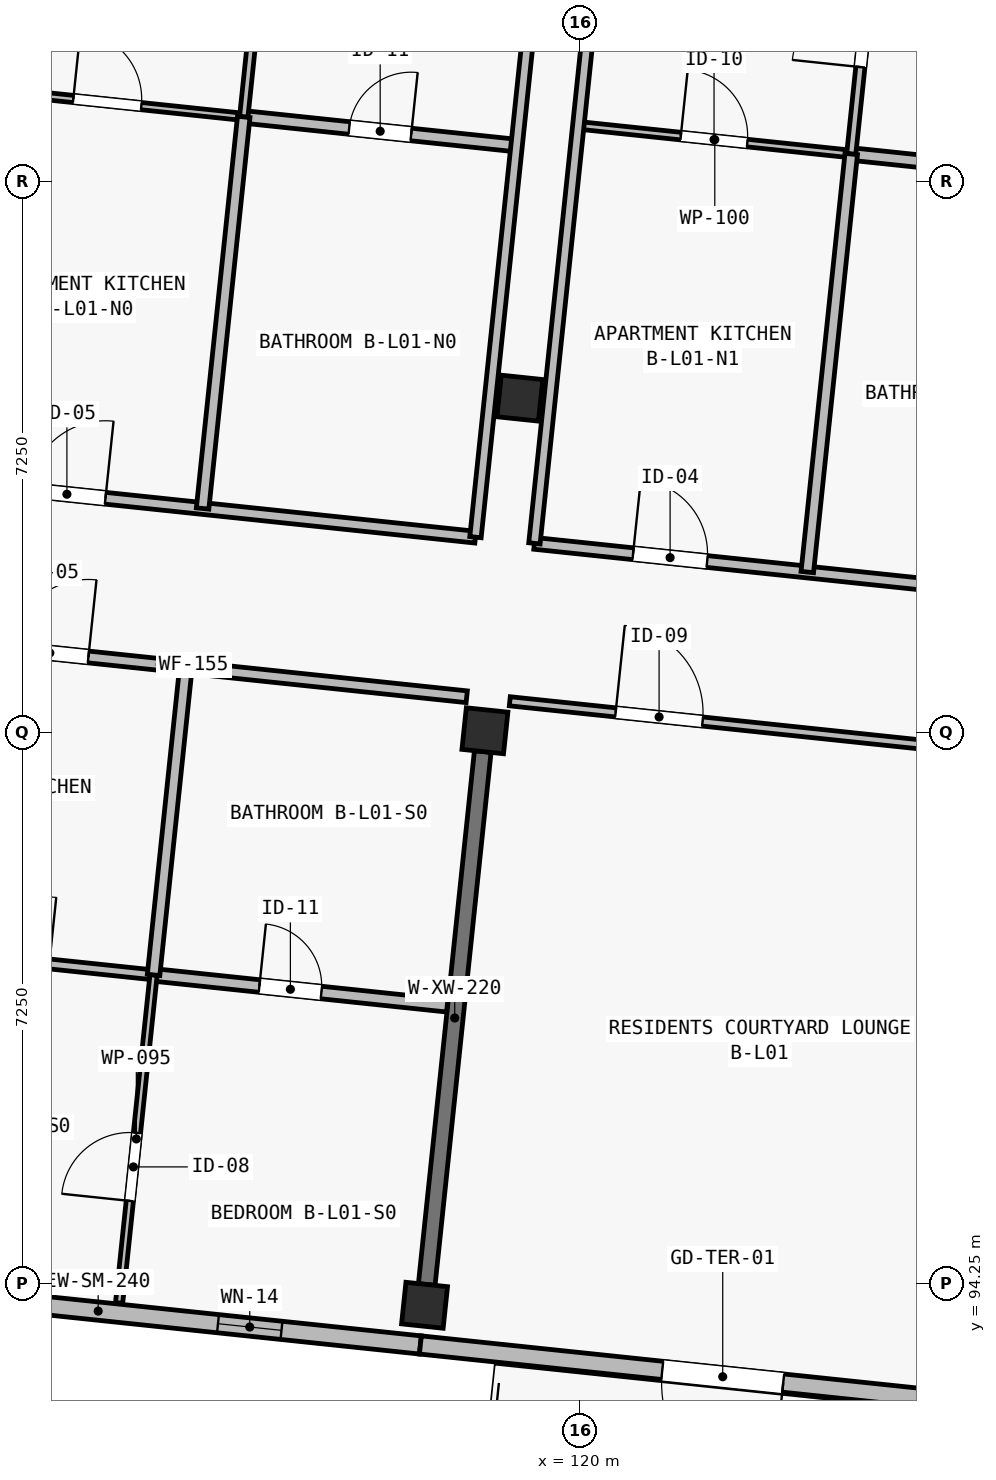
"""IFC4 building model, lengths in metres.
Left out: names, types, materials, properties, quantities, classifications, styles, units other than length and angle.
Written with IfcOpenShell. Run it as: python <this file> out.ifc"""

import sys

from ifc_helpers import new_model, si_unit, direction, frame, frame_2d, origin, origin_2d, place, context, subcontext, project, spatial, rectangle, extrude, element, fill, save


model = new_model("IFC4")
c1 = context("Model", 3, precision=1e-05, world=origin(), true_north=direction((0.0, 1.0)))
c2 = subcontext(c1, "Body", "Model", "MODEL_VIEW")
j1 = project(units=[si_unit("LENGTHUNIT", "METRE"), si_unit("PLANEANGLEUNIT", "RADIAN")], contexts=[c1])
p1 = place(None, origin())
s1 = spatial("IfcSite", under=j1, at=p1, CompositionType="ELEMENT")
p2 = place(p1, origin())
s2 = spatial("IfcBuilding", under=s1, at=p2, CompositionType="ELEMENT")
p3 = place(p2, frame((0.0, 0.0, 4.5)))
s3 = spatial("IfcBuildingStorey", under=s2, at=p3, CompositionType="ELEMENT", Elevation=4.5)
for number, where, z_axis, x_axis in (
    (1, (117.956, 93.964, 0.0), (0.0, 0.0, 1.0), (0.995, -0.105, 0.0)),
    (2, (118.75, 101.522, 0.0), (0.0, 0.0, 1.0), (0.995, -0.105, 0.0)),
    (3, (119.21, 105.898, 0.0), (0.0, 0.0, 1.0), (0.995, -0.105, 0.0)),
):
    element("IfcColumn", number, at=place(p3, frame(where, z_axis=z_axis, x_axis=x_axis)), inside=s3, PredefinedType="COLUMN", context=c2, shape_type="SweptSolid", body=[
        extrude(rectangle(XDim=0.55, YDim=0.55, at=origin_2d()), origin(), (0.0, 0.0, 1.0), 3.9),
    ])
p4 = place(p3, frame((117.985, 94.237, -0.25), z_axis=(0.0, 0.0, 1.0), x_axis=(0.104549582151, 0.994519675458, 0.0)))
e4 = element("IfcWall", 4, at=p4, inside=s3, PredefinedType="SHEAR", context=c2, shape_type="SweptSolid", body=[
    extrude(rectangle(XDim=7.05, YDim=0.22, at=frame_2d((3.525, 0.0))), origin(), (0.0, 0.0, 1.0), 3.4),
])
p5 = place(p3, frame((117.901, 93.442, 0.0), z_axis=(0.0, 0.0, 1.0), x_axis=(-0.994521760736, 0.104529744196, 0.0)))
e5 = element("IfcWall", 5, at=p5, inside=s3, PredefinedType="SOLIDWALL", context=c2, shape_type="SweptSolid", body=[
    extrude(rectangle(XDim=8.525, YDim=0.24, at=frame_2d((4.262, 0.0))), origin(), (0.0, 0.0, 1.0), 3.65),
])
p6 = place(p5, frame((1.837, 0.0, 0.48)))
e6 = element("IfcOpeningElement", 6, at=p6, cuts=e5, PredefinedType="OPENING", context=c2, shape_type="SweptSolid", body=[
    extrude(rectangle(XDim=0.84, YDim=2.28, at=frame_2d((0.42, 1.14))), frame((0.0, 0.135, 0.0), z_axis=(0.0, -1.0, 0.0), x_axis=(1.0, 0.0, 0.0)), (0.0, 0.0, 1.0), 0.27),
])
p7 = place(p5, frame((5.366, 0.0, 0.48)))
e7 = element("IfcOpeningElement", 7, at=p7, cuts=e5, PredefinedType="OPENING", context=c2, shape_type="SweptSolid", body=[
    extrude(rectangle(XDim=0.6, YDim=2.22, at=frame_2d((0.3, 1.11))), frame((0.0, 0.135, 0.0), z_axis=(0.0, -1.0, 0.0), x_axis=(1.0, 0.0, 0.0)), (0.0, 0.0, 1.0), 0.27),
])
p8 = place(p3, frame((125.857, 92.605, 0.0), z_axis=(0.0, 0.0, 1.0), x_axis=(-0.994522329422, 0.104524333444, 0.0)))
e8 = element("IfcWall", 8, at=p8, inside=s3, PredefinedType="SOLIDWALL", context=c2, shape_type="SweptSolid", body=[
    extrude(rectangle(XDim=8.0, YDim=0.24, at=frame_2d((4.0, 0.0))), origin(), (0.0, 0.0, 1.0), 3.65),
])
p9 = place(p8, frame((3.2, 0.0, 0.0)))
e9 = element("IfcOpeningElement", 9, at=p9, cuts=e8, PredefinedType="OPENING", context=c2, shape_type="SweptSolid", body=[
    extrude(rectangle(XDim=1.6, YDim=2.15, at=frame_2d((0.8, 1.075))), frame((0.0, 0.135, 0.0), z_axis=(0.0, -1.0, 0.0), x_axis=(1.0, 0.0, 0.0)), (0.0, 0.0, 1.0), 0.27),
])
p10 = place(p3, frame((110.446, 102.817, 0.0), z_axis=(0.0, 0.0, 1.0), x_axis=(0.994522594842, -0.104521808006, 0.0)))
e10 = element("IfcWall", 10, at=p10, inside=s3, PredefinedType="PARTITIONING", context=c2, shape_type="SweptSolid", body=[
    extrude(rectangle(XDim=8.11, YDim=0.155, at=frame_2d((4.055, 0.0))), origin(), (0.0, 0.0, 1.0), 3.62),
])
p11 = place(p10, frame((2.085, 0.0, 0.0)))
e11 = element("IfcOpeningElement", 11, at=p11, cuts=e10, PredefinedType="OPENING", context=c2, shape_type="SweptSolid", body=[
    extrude(rectangle(XDim=1.02, YDim=2.2, at=frame_2d((0.51, 1.1))), frame((0.0, 0.093, 0.0), z_axis=(0.0, -1.0, 0.0), x_axis=(1.0, 0.0, 0.0)), (0.0, 0.0, 1.0), 0.185),
])
p12 = place(p3, frame((110.02, 98.77, 0.0), z_axis=(0.0, 0.0, 1.0), x_axis=(0.994525828039, -0.104491039633, 0.0)))
e12 = element("IfcWall", 12, at=p12, inside=s3, PredefinedType="PARTITIONING", context=c2, shape_type="SweptSolid", body=[
    extrude(rectangle(XDim=4.395, YDim=0.13, at=frame_2d((2.198, 0.0))), origin(), (0.0, 0.0, 1.0), 3.62),
])
p13 = place(p12, frame((2.135, 0.0, 0.0)))
e13 = element("IfcOpeningElement", 13, at=p13, cuts=e12, PredefinedType="OPENING", context=c2, shape_type="SweptSolid", body=[
    extrude(rectangle(XDim=0.88, YDim=2.1, at=frame_2d((0.44, 1.05))), frame((0.0, 0.08, 0.0), z_axis=(0.0, -1.0, 0.0), x_axis=(1.0, 0.0, 0.0)), (0.0, 0.0, 1.0), 0.16),
])
p14 = place(p3, frame((114.391, 98.31, 0.0), z_axis=(0.0, 0.0, 1.0), x_axis=(0.994517841934, -0.104567021925, 0.0)))
e14 = element("IfcWall", 14, at=p14, inside=s3, PredefinedType="PLUMBINGWALL", context=c2, shape_type="SweptSolid", body=[
    extrude(rectangle(XDim=3.885, YDim=0.165, at=frame_2d((1.942, 0.0))), origin(), (0.0, 0.0, 1.0), 3.62),
])
p15 = place(p14, frame((1.4, 0.0, 0.0)))
e15 = element("IfcOpeningElement", 15, at=p15, cuts=e14, PredefinedType="OPENING", context=c2, shape_type="SweptSolid", body=[
    extrude(rectangle(XDim=0.82, YDim=2.08, at=frame_2d((0.41, 1.04))), frame((0.0, 0.097, 0.0), z_axis=(0.0, -1.0, 0.0), x_axis=(1.0, 0.0, 0.0)), (0.0, 0.0, 1.0), 0.195),
])
p16 = place(p3, frame((113.937, 93.994, 0.0), z_axis=(0.0, 0.0, 1.0), x_axis=(0.104520797474, 0.994522701046, 0.0)))
e16 = element("IfcWall", 16, at=p16, inside=s3, PredefinedType="PARTITIONING", context=c2, shape_type="SweptSolid", body=[
    extrude(rectangle(XDim=4.34, YDim=0.095, at=frame_2d((2.17, 0.0))), origin(), (0.0, 0.0, 1.0), 3.62),
])
p17 = place(p16, frame((1.35, 0.0, 0.0)))
e17 = element("IfcOpeningElement", 17, at=p17, cuts=e16, PredefinedType="OPENING", context=c2, shape_type="SweptSolid", body=[
    extrude(rectangle(XDim=0.9, YDim=2.1, at=frame_2d((0.45, 1.05))), frame((0.0, 0.062, 0.0), z_axis=(0.0, -1.0, 0.0), x_axis=(1.0, 0.0, 0.0)), (0.0, 0.0, 1.0), 0.125),
])
p18 = place(p3, frame((114.391, 98.31, 0.0), z_axis=(0.0, 0.0, 1.0), x_axis=(0.104556757316, 0.994518921137, 0.0)))
e18 = element("IfcWall", 18, at=p18, inside=s3, PredefinedType="PLUMBINGWALL", context=c2, shape_type="SweptSolid", body=[
    extrude(rectangle(XDim=4.07, YDim=0.165, at=frame_2d((2.035, 0.0))), origin(), (0.0, 0.0, 1.0), 3.62),
])
p19 = place(p3, frame((119.078, 101.91, 0.0), z_axis=(0.0, 0.0, 1.0), x_axis=(0.99451912784, -0.104554791185, 0.0)))
e19 = element("IfcWall", 19, at=p19, inside=s3, PredefinedType="PARTITIONING", context=c2, shape_type="SweptSolid", body=[
    extrude(rectangle(XDim=7.43, YDim=0.12, at=frame_2d((3.715, 0.0))), origin(), (0.0, 0.0, 1.0), 3.62),
])
p20 = place(p19, frame((1.4, 0.0, 0.0)))
e20 = element("IfcOpeningElement", 20, at=p20, cuts=e19, PredefinedType="OPENING", context=c2, shape_type="SweptSolid", body=[
    extrude(rectangle(XDim=1.15, YDim=2.15, at=frame_2d((0.575, 1.075))), frame((0.0, 0.075, 0.0), z_axis=(0.0, -1.0, 0.0), x_axis=(1.0, 0.0, 0.0)), (0.0, 0.0, 1.0), 0.15),
])
p21 = place(p3, frame((111.446, 104.824, 0.0), z_axis=(0.0, 0.0, 1.0), x_axis=(0.994522671024, -0.104521083137, 0.0)))
e21 = element("IfcWall", 21, at=p21, inside=s3, PredefinedType="PARTITIONING", context=c2, shape_type="SweptSolid", body=[
    extrude(rectangle(XDim=7.22, YDim=0.155, at=frame_2d((3.61, 0.0))), origin(), (0.0, 0.0, 1.0), 3.62),
])
p22 = place(p21, frame((1.305, 0.0, 0.0)))
e22 = element("IfcOpeningElement", 22, at=p22, cuts=e21, PredefinedType="OPENING", context=c2, shape_type="SweptSolid", body=[
    extrude(rectangle(XDim=1.02, YDim=2.2, at=frame_2d((0.51, 1.1))), frame((0.0, 0.093, 0.0), z_axis=(0.0, -1.0, 0.0), x_axis=(1.0, 0.0, 0.0)), (0.0, 0.0, 1.0), 0.185),
])
p23 = place(p3, frame((111.987, 109.975, 0.0), z_axis=(0.0, 0.0, 1.0), x_axis=(0.994526554618, -0.104484123955, 0.0)))
e23 = element("IfcWall", 23, at=p23, inside=s3, PredefinedType="PARTITIONING", context=c2, shape_type="SweptSolid", body=[
    extrude(rectangle(XDim=3.61, YDim=0.095, at=frame_2d((1.805, 0.0))), origin(), (0.0, 0.0, 1.0), 3.62),
])
p24 = place(p23, frame((1.355, 0.0, 0.0)))
e24 = element("IfcOpeningElement", 24, at=p24, cuts=e23, PredefinedType="OPENING", context=c2, shape_type="SweptSolid", body=[
    extrude(rectangle(XDim=0.9, YDim=2.1, at=frame_2d((0.45, 1.05))), frame((0.0, 0.062, 0.0), z_axis=(0.0, -1.0, 0.0), x_axis=(1.0, 0.0, 0.0)), (0.0, 0.0, 1.0), 0.125),
])
p25 = place(p3, frame((115.577, 109.598, 0.0), z_axis=(0.0, 0.0, 1.0), x_axis=(0.994518785821, -0.104558044398, 0.0)))
e25 = element("IfcWall", 25, at=p25, inside=s3, PredefinedType="PLUMBINGWALL", context=c2, shape_type="SweptSolid", body=[
    extrude(rectangle(XDim=3.61, YDim=0.165, at=frame_2d((1.805, 0.0))), origin(), (0.0, 0.0, 1.0), 3.62),
])
p26 = place(p25, frame((1.395, 0.0, 0.0)))
e26 = element("IfcOpeningElement", 26, at=p26, cuts=e25, PredefinedType="OPENING", context=c2, shape_type="SweptSolid", body=[
    extrude(rectangle(XDim=0.82, YDim=2.08, at=frame_2d((0.41, 1.04))), frame((0.0, 0.097, 0.0), z_axis=(0.0, -1.0, 0.0), x_axis=(1.0, 0.0, 0.0)), (0.0, 0.0, 1.0), 0.195),
])
p27 = place(p3, frame((115.577, 109.598, 0.0), z_axis=(0.0, 0.0, 1.0), x_axis=(0.104527618124, 0.994521984196, 0.0)))
e27 = element("IfcWall", 27, at=p27, inside=s3, PredefinedType="PARTITIONING", context=c2, shape_type="SweptSolid", body=[
    extrude(rectangle(XDim=4.69, YDim=0.11, at=frame_2d((2.345, 0.0))), origin(), (0.0, 0.0, 1.0), 3.62),
])
p28 = place(p27, frame((1.15, 0.0, 0.0)))
e28 = element("IfcOpeningElement", 28, at=p28, cuts=e27, PredefinedType="OPENING", context=c2, shape_type="SweptSolid", body=[
    extrude(rectangle(XDim=0.9, YDim=2.1, at=frame_2d((0.45, 1.05))), frame((0.0, 0.07, 0.0), z_axis=(0.0, -1.0, 0.0), x_axis=(1.0, 0.0, 0.0)), (0.0, 0.0, 1.0), 0.14),
])
p29 = place(p3, frame((115.036, 104.447, 0.0), z_axis=(0.0, 0.0, 1.0), x_axis=(0.104537578263, 0.994520937301, 0.0)))
e29 = element("IfcWall", 29, at=p29, inside=s3, PredefinedType="PLUMBINGWALL", context=c2, shape_type="SweptSolid", body=[
    extrude(rectangle(XDim=5.18, YDim=0.165, at=frame_2d((2.59, 0.0))), origin(), (0.0, 0.0, 1.0), 3.62),
])
p30 = place(p3, frame((118.626, 104.069, 0.0), z_axis=(0.0, 0.0, 1.0), x_axis=(0.104508379977, 0.994524006002, 0.0)))
e30 = element("IfcWall", 30, at=p30, inside=s3, PredefinedType="PARTITIONING", context=c2, shape_type="SweptSolid", body=[
    extrude(rectangle(XDim=9.87, YDim=0.15, at=frame_2d((4.935, 0.0))), origin(), (0.0, 0.0, 1.0), 3.62),
])
p31 = place(p3, frame((119.402, 103.988, 0.0), z_axis=(0.0, 0.0, 1.0), x_axis=(0.994522671024, -0.104521083137, 0.0)))
e31 = element("IfcWall", 31, at=p31, inside=s3, PredefinedType="PARTITIONING", context=c2, shape_type="SweptSolid", body=[
    extrude(rectangle(XDim=7.22, YDim=0.155, at=frame_2d((3.61, 0.0))), origin(), (0.0, 0.0, 1.0), 3.62),
])
p32 = place(p31, frame((1.305, 0.0, 0.0)))
e32 = element("IfcOpeningElement", 32, at=p32, cuts=e31, PredefinedType="OPENING", context=c2, shape_type="SweptSolid", body=[
    extrude(rectangle(XDim=0.98, YDim=2.15, at=frame_2d((0.49, 1.075))), frame((0.0, 0.093, 0.0), z_axis=(0.0, -1.0, 0.0), x_axis=(1.0, 0.0, 0.0)), (0.0, 0.0, 1.0), 0.185),
])
p33 = place(p3, frame((119.98, 109.487, 0.0), z_axis=(0.0, 0.0, 1.0), x_axis=(0.994518785821, -0.104558044398, 0.0)))
e33 = element("IfcWall", 33, at=p33, inside=s3, PredefinedType="PARTITIONING", context=c2, shape_type="SweptSolid", body=[
    extrude(rectangle(XDim=3.61, YDim=0.1, at=frame_2d((1.805, 0.0))), origin(), (0.0, 0.0, 1.0), 3.62),
])
p34 = place(p33, frame((1.355, 0.0, 0.0)))
e34 = element("IfcOpeningElement", 34, at=p34, cuts=e33, PredefinedType="OPENING", context=c2, shape_type="SweptSolid", body=[
    extrude(rectangle(XDim=0.88, YDim=2.1, at=frame_2d((0.44, 1.05))), frame((0.0, 0.065, 0.0), z_axis=(0.0, -1.0, 0.0), x_axis=(1.0, 0.0, 0.0)), (0.0, 0.0, 1.0), 0.13),
])
p35 = place(p3, frame((123.57, 109.11, 0.0), z_axis=(0.0, 0.0, 1.0), x_axis=(0.994526554618, -0.104484123955, 0.0)))
e35 = element("IfcWall", 35, at=p35, inside=s3, PredefinedType="PLUMBINGWALL", context=c2, shape_type="SweptSolid", body=[
    extrude(rectangle(XDim=3.61, YDim=0.165, at=frame_2d((1.805, 0.0))), origin(), (0.0, 0.0, 1.0), 3.62),
])
p36 = place(p35, frame((1.395, 0.0, 0.0)))
e36 = element("IfcOpeningElement", 36, at=p36, cuts=e35, PredefinedType="OPENING", context=c2, shape_type="SweptSolid", body=[
    extrude(rectangle(XDim=0.82, YDim=2.08, at=frame_2d((0.41, 1.04))), frame((0.0, 0.097, 0.0), z_axis=(0.0, -1.0, 0.0), x_axis=(1.0, 0.0, 0.0)), (0.0, 0.0, 1.0), 0.195),
])
p37 = place(p3, frame((123.57, 109.11, 0.0), z_axis=(0.0, 0.0, 1.0), x_axis=(0.104514950243, 0.994523315552, 0.0)))
e37 = element("IfcWall", 37, at=p37, inside=s3, PredefinedType="PARTITIONING", context=c2, shape_type="SweptSolid", body=[
    extrude(rectangle(XDim=4.34, YDim=0.12, at=frame_2d((2.17, 0.0))), origin(), (0.0, 0.0, 1.0), 3.62),
])
p38 = place(p37, frame((1.15, 0.0, 0.0)))
e38 = element("IfcOpeningElement", 38, at=p38, cuts=e37, PredefinedType="OPENING", context=c2, shape_type="SweptSolid", body=[
    extrude(rectangle(XDim=0.9, YDim=2.1, at=frame_2d((0.45, 1.05))), frame((0.0, 0.075, 0.0), z_axis=(0.0, -1.0, 0.0), x_axis=(1.0, 0.0, 0.0)), (0.0, 0.0, 1.0), 0.15),
])
p39 = place(p3, frame((122.992, 103.61, 0.0), z_axis=(0.0, 0.0, 1.0), x_axis=(0.104498634796, 0.994525030015, 0.0)))
e39 = element("IfcWall", 39, at=p39, inside=s3, PredefinedType="PLUMBINGWALL", context=c2, shape_type="SweptSolid", body=[
    extrude(rectangle(XDim=5.53, YDim=0.165, at=frame_2d((2.765, 0.0))), origin(), (0.0, 0.0, 1.0), 3.62),
])
p40 = place(p3, frame((119.402, 103.988, 0.0), z_axis=(0.0, 0.0, 1.0), x_axis=(0.10453284543, 0.994521434775, 0.0)))
e40 = element("IfcWall", 40, at=p40, inside=s3, PredefinedType="PARTITIONING", context=c2, shape_type="SweptSolid", body=[
    extrude(rectangle(XDim=9.87, YDim=0.15, at=frame_2d((4.935, 0.0))), origin(), (0.0, 0.0, 1.0), 3.62),
])
p41 = place(p6, origin())
e41 = element("IfcWindow", 41, at=p41, inside=s3, PartitioningType="SINGLE_PANEL", PredefinedType="WINDOW", context=c2, shape_type="SweptSolid", body=[
    extrude(rectangle(XDim=0.84, YDim=2.28, at=frame_2d((0.42, 1.14))), frame((0.0, 0.03, 0.0), z_axis=(0.0, -1.0, 0.0), x_axis=(1.0, 0.0, 0.0)), (0.0, 0.0, 1.0), 0.06),
])
fill(e6, e41)
p42 = place(p9, origin())
e42 = element("IfcDoor", 42, at=p42, inside=s3, OperationType="DOUBLE_DOOR_SINGLE_SWING", PredefinedType="DOOR", context=c2, shape_type="SweptSolid", body=[
    extrude(rectangle(XDim=1.6, YDim=2.15, at=frame_2d((0.8, 1.075))), frame((0.0, 0.025, 0.0), z_axis=(0.0, -1.0, 0.0), x_axis=(1.0, 0.0, 0.0)), (0.0, 0.0, 1.0), 0.05),
])
fill(e9, e42)
p43 = place(p11, origin())
e43 = element("IfcDoor", 43, at=p43, inside=s3, OperationType="SINGLE_SWING_RIGHT", PredefinedType="DOOR", context=c2, shape_type="SweptSolid", body=[
    extrude(rectangle(XDim=1.02, YDim=2.2, at=frame_2d((0.51, 1.1))), frame((0.0, 0.025, 0.0), z_axis=(0.0, -1.0, 0.0), x_axis=(1.0, 0.0, 0.0)), (0.0, 0.0, 1.0), 0.05),
])
fill(e11, e43)
p44 = place(p15, origin())
e44 = element("IfcDoor", 44, at=p44, inside=s3, OperationType="SINGLE_SWING_LEFT", PredefinedType="DOOR", context=c2, shape_type="SweptSolid", body=[
    extrude(rectangle(XDim=0.82, YDim=2.08, at=frame_2d((0.41, 1.04))), frame((0.0, 0.025, 0.0), z_axis=(0.0, -1.0, 0.0), x_axis=(1.0, 0.0, 0.0)), (0.0, 0.0, 1.0), 0.05),
])
fill(e15, e44)
p45 = place(p17, origin())
e45 = element("IfcDoor", 45, at=p45, inside=s3, OperationType="SINGLE_SWING_LEFT", PredefinedType="DOOR", context=c2, shape_type="SweptSolid", body=[
    extrude(rectangle(XDim=0.9, YDim=2.1, at=frame_2d((0.45, 1.05))), frame((0.0, 0.025, 0.0), z_axis=(0.0, -1.0, 0.0), x_axis=(1.0, 0.0, 0.0)), (0.0, 0.0, 1.0), 0.05),
])
fill(e17, e45)
p46 = place(p20, origin())
e46 = element("IfcDoor", 46, at=p46, inside=s3, OperationType="SINGLE_SWING_LEFT", PredefinedType="DOOR", context=c2, shape_type="SweptSolid", body=[
    extrude(rectangle(XDim=1.15, YDim=2.15, at=frame_2d((0.575, 1.075))), frame((0.0, 0.025, 0.0), z_axis=(0.0, -1.0, 0.0), x_axis=(1.0, 0.0, 0.0)), (0.0, 0.0, 1.0), 0.05),
])
fill(e20, e46)
p47 = place(p22, origin())
e47 = element("IfcDoor", 47, at=p47, inside=s3, OperationType="SINGLE_SWING_RIGHT", PredefinedType="DOOR", context=c2, shape_type="SweptSolid", body=[
    extrude(rectangle(XDim=1.02, YDim=2.2, at=frame_2d((0.51, 1.1))), frame((0.0, 0.025, 0.0), z_axis=(0.0, -1.0, 0.0), x_axis=(1.0, 0.0, 0.0)), (0.0, 0.0, 1.0), 0.05),
])
fill(e22, e47)
p48 = place(p24, origin())
e48 = element("IfcDoor", 48, at=p48, inside=s3, OperationType="SINGLE_SWING_LEFT", PredefinedType="DOOR", context=c2, shape_type="SweptSolid", body=[
    extrude(rectangle(XDim=0.9, YDim=2.1, at=frame_2d((0.45, 1.05))), frame((0.0, 0.025, 0.0), z_axis=(0.0, -1.0, 0.0), x_axis=(1.0, 0.0, 0.0)), (0.0, 0.0, 1.0), 0.05),
])
fill(e24, e48)
p49 = place(p26, origin())
e49 = element("IfcDoor", 49, at=p49, inside=s3, OperationType="SINGLE_SWING_RIGHT", PredefinedType="DOOR", context=c2, shape_type="SweptSolid", body=[
    extrude(rectangle(XDim=0.82, YDim=2.08, at=frame_2d((0.41, 1.04))), frame((0.0, 0.025, 0.0), z_axis=(0.0, -1.0, 0.0), x_axis=(1.0, 0.0, 0.0)), (0.0, 0.0, 1.0), 0.05),
])
fill(e26, e49)
p50 = place(p32, origin())
e50 = element("IfcDoor", 50, at=p50, inside=s3, OperationType="SINGLE_SWING_LEFT", PredefinedType="DOOR", context=c2, shape_type="SweptSolid", body=[
    extrude(rectangle(XDim=0.98, YDim=2.15, at=frame_2d((0.49, 1.075))), frame((0.0, 0.025, 0.0), z_axis=(0.0, -1.0, 0.0), x_axis=(1.0, 0.0, 0.0)), (0.0, 0.0, 1.0), 0.05),
])
fill(e32, e50)
p51 = place(p34, origin())
e51 = element("IfcDoor", 51, at=p51, inside=s3, OperationType="SINGLE_SWING_LEFT", PredefinedType="DOOR", context=c2, shape_type="SweptSolid", body=[
    extrude(rectangle(XDim=0.88, YDim=2.1, at=frame_2d((0.44, 1.05))), frame((0.0, 0.025, 0.0), z_axis=(0.0, -1.0, 0.0), x_axis=(1.0, 0.0, 0.0)), (0.0, 0.0, 1.0), 0.05),
])
fill(e34, e51)
p52 = place(p38, origin())
e52 = element("IfcDoor", 52, at=p52, inside=s3, OperationType="SINGLE_SWING_LEFT", PredefinedType="DOOR", context=c2, shape_type="SweptSolid", body=[
    extrude(rectangle(XDim=0.9, YDim=2.1, at=frame_2d((0.45, 1.05))), frame((0.0, 0.025, 0.0), z_axis=(0.0, -1.0, 0.0), x_axis=(1.0, 0.0, 0.0)), (0.0, 0.0, 1.0), 0.05),
])
fill(e38, e52)
save(model, sys.argv[1])
